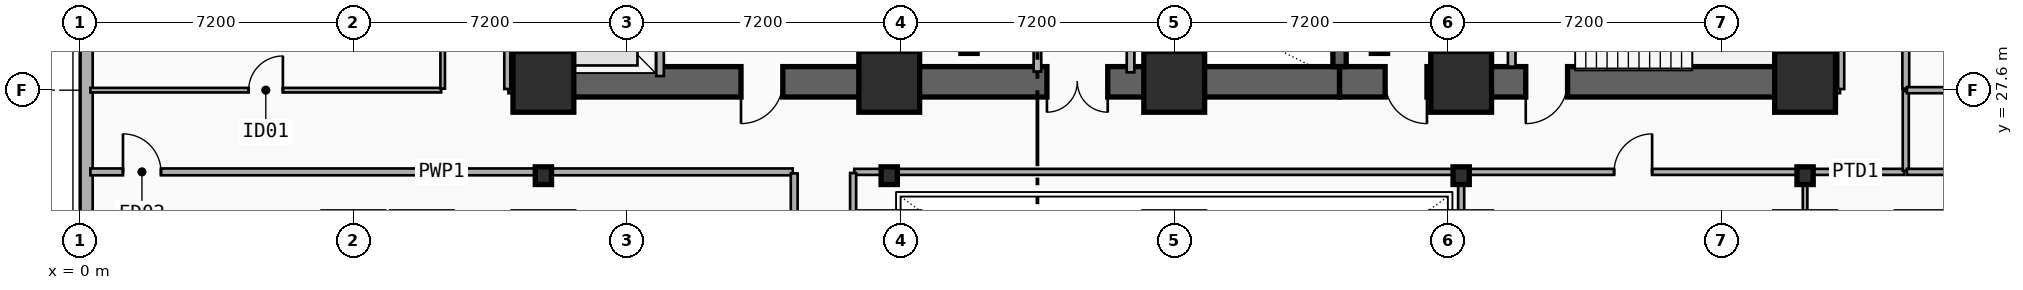
"""IFC4 building model, lengths in metres.
Left out: names, types, materials, properties, quantities, classifications, styles, units other than length and angle.
Written with IfcOpenShell. Run it as: python <this file> out.ifc"""

import sys

from ifc_helpers import new_model, si_unit, direction, frame, frame_2d, origin, origin_2d, place, context, subcontext, project, spatial, rectangle, i_section, extrude, element, fill, save


model = new_model("IFC4")
c1 = context("Model", 3, precision=1e-05, world=origin(), true_north=direction((0.0, 1.0)))
c2 = subcontext(c1, "Body", "Model", "MODEL_VIEW")
j1 = project(units=[si_unit("LENGTHUNIT", "METRE"), si_unit("PLANEANGLEUNIT", "RADIAN")], contexts=[c1])
p1 = place(None, origin())
s1 = spatial("IfcSite", under=j1, at=p1, CompositionType="ELEMENT")
p2 = place(p1, origin())
s2 = spatial("IfcBuilding", under=s1, at=p2, CompositionType="ELEMENT")
p3 = place(p2, frame((0.0, 0.0, 14.9)))
s3 = spatial("IfcBuildingStorey", under=s2, at=p3, CompositionType="ELEMENT", Elevation=14.9)
p4 = place(p3, frame((21.18, 27.82, 0.0), z_axis=(0.0, 0.0, 1.0), x_axis=(-1.0, 0.0, 0.0)))
e1 = element("IfcWall", 1, at=p4, inside=s3, PredefinedType="SHEAR", context=c2, shape_type="SweptSolid", body=[
    extrude(rectangle(XDim=9.03, YDim=0.8, at=frame_2d((4.515, 0.0))), origin(), (0.0, 0.0, 1.0), 4.5),
])
p5 = place(p4, frame((2.68, 0.0, 0.0)))
e2 = element("IfcOpeningElement", 2, at=p5, cuts=e1, PredefinedType="OPENING", context=c2, shape_type="SweptSolid", body=[
    extrude(rectangle(XDim=1.1, YDim=2.15, at=frame_2d((0.55, 1.075))), frame((0.0, 0.41, 0.0), z_axis=(0.0, -1.0, 0.0), x_axis=(1.0, 0.0, 0.0)), (0.0, 0.0, 1.0), 0.82),
])
p6 = place(p3, frame((33.15, 27.82, 0.0), z_axis=(0.0, 0.0, 1.0), x_axis=(-1.0, 0.0, 0.0)))
e3 = element("IfcWall", 3, at=p6, inside=s3, PredefinedType="SHEAR", context=c2, shape_type="SweptSolid", body=[
    extrude(rectangle(XDim=11.97, YDim=0.8, at=frame_2d((5.985, 0.0))), origin(), (0.0, 0.0, 1.0), 4.5),
])
p7 = place(p6, frame((6.1, 0.0, 0.0)))
e4 = element("IfcOpeningElement", 4, at=p7, cuts=e3, PredefinedType="OPENING", context=c2, shape_type="SweptSolid", body=[
    extrude(rectangle(XDim=1.6, YDim=2.2, at=frame_2d((0.8, 1.1))), frame((0.0, 0.41, 0.0), z_axis=(0.0, -1.0, 0.0), x_axis=(1.0, 0.0, 0.0)), (0.0, 0.0, 1.0), 0.82),
])
p8 = place(p3, frame((45.38, 27.82, 0.0), z_axis=(0.0, 0.0, 1.0), x_axis=(-1.0, 0.0, 0.0)))
e5 = element("IfcWall", 5, at=p8, inside=s3, PredefinedType="SHEAR", context=c2, shape_type="SweptSolid", body=[
    extrude(rectangle(XDim=12.23, YDim=0.8, at=frame_2d((6.115, 0.0))), origin(), (0.0, 0.0, 1.0), 4.5),
])
p9 = place(p8, frame((9.93, 0.0, 0.0)))
e6 = element("IfcOpeningElement", 6, at=p9, cuts=e5, PredefinedType="OPENING", context=c2, shape_type="SweptSolid", body=[
    extrude(rectangle(XDim=1.1, YDim=2.15, at=frame_2d((0.55, 1.075))), frame((0.0, 0.41, 0.0), z_axis=(0.0, -1.0, 0.0), x_axis=(1.0, 0.0, 0.0)), (0.0, 0.0, 1.0), 0.82),
])
p10 = place(p8, frame((6.23, 0.0, 0.0)))
e7 = element("IfcOpeningElement", 7, at=p10, cuts=e5, PredefinedType="OPENING", context=c2, shape_type="SweptSolid", body=[
    extrude(rectangle(XDim=1.1, YDim=2.15, at=frame_2d((0.55, 1.075))), frame((0.0, 0.41, 0.0), z_axis=(0.0, -1.0, 0.0), x_axis=(1.0, 0.0, 0.0)), (0.0, 0.0, 1.0), 0.82),
])
for number, where, z_axis, x_axis in (
    (8, (12.15, 28.22, 0.0), (0.0, 0.0, 1.0), (0.0, 1.0, 0.0)),
    (9, (45.38, 28.22, 0.0), (0.0, 0.0, 1.0), (0.0, 1.0, 0.0)),
):
    element("IfcWall", number, at=place(p3, frame(where, z_axis=z_axis, x_axis=x_axis)), inside=s3, PredefinedType="SHEAR", context=c2, shape_type="SweptSolid", body=[
        extrude(rectangle(XDim=8.43, YDim=0.8, at=frame_2d((4.215, 0.0))), origin(), (0.0, 0.0, 1.0), 4.5),
    ])
for number, where, z_axis, x_axis in (
    (10, (21.18, 28.22, 0.0), (0.0, 0.0, 1.0), (0.0, 1.0, 0.0)),
    (11, (33.15, 28.22, 0.0), (0.0, 0.0, 1.0), (0.0, 1.0, 0.0)),
):
    element("IfcWall", number, at=place(p3, frame(where, z_axis=z_axis, x_axis=x_axis)), inside=s3, PredefinedType="SHEAR", context=c2, shape_type="SweptSolid", body=[
        extrude(rectangle(XDim=8.43, YDim=0.35, at=frame_2d((4.215, 0.0))), origin(), (0.0, 0.0, 1.0), 4.5),
    ])
p11 = place(p3, frame((36.38, 28.22, 0.0), z_axis=(0.0, 0.0, 1.0), x_axis=(0.0, 1.0, 0.0)))
e12 = element("IfcWall", 12, at=p11, inside=s3, PredefinedType="SHEAR", context=c2, shape_type="SweptSolid", body=[
    extrude(rectangle(XDim=8.43, YDim=0.35, at=frame_2d((4.215, 0.0))), origin(), (0.0, 0.0, 1.0), 4.5),
])
p12 = place(p11, frame((3.56, 0.0, 0.0)))
e13 = element("IfcOpeningElement", 13, at=p12, cuts=e12, PredefinedType="OPENING", context=c2, shape_type="SweptSolid", body=[
    extrude(rectangle(XDim=1.1, YDim=2.15, at=frame_2d((0.55, 1.075))), frame((0.0, 0.185, 0.0), z_axis=(0.0, -1.0, 0.0), x_axis=(1.0, 0.0, 0.0)), (0.0, 0.0, 1.0), 0.37),
])
for number, where, z_axis, x_axis in (
    (14, (23.4, 28.8, 0.0), (0.0, 0.0, 1.0), (1.0, 0.0, 0.0)),
    (15, (34.2, 28.8, 0.0), (0.0, 0.0, 1.0), (1.0, 0.0, 0.0)),
):
    element("IfcColumn", number, at=place(p3, frame(where, z_axis=z_axis, x_axis=x_axis)), inside=s3, PredefinedType="COLUMN", context=c2, shape_type="SweptSolid", body=[
        extrude(i_section(OverallWidth=0.428, OverallDepth=0.465, WebThickness=0.045, FlangeThickness=0.073, FilletRadius=0.015, at=origin_2d()), origin(), (0.0, 0.0, 1.0), 4.5),
    ])
for number, where, z_axis, x_axis in (
    (16, (12.2, 27.82, 0.0), (0.0, 0.0, 1.0), (1.0, 0.0, 0.0)),
    (17, (21.3, 27.82, 0.0), (0.0, 0.0, 1.0), (1.0, 0.0, 0.0)),
    (18, (28.8, 27.82, 0.0), (0.0, 0.0, 1.0), (1.0, 0.0, 0.0)),
    (19, (36.35, 27.82, 0.0), (0.0, 0.0, 1.0), (1.0, 0.0, 0.0)),
    (20, (45.4, 27.82, 0.0), (0.0, 0.0, 1.0), (1.0, 0.0, 0.0)),
):
    element("IfcColumn", number, at=place(p3, frame(where, z_axis=z_axis, x_axis=x_axis)), inside=s3, PredefinedType="COLUMN", context=c2, shape_type="SweptSolid", body=[
        extrude(rectangle(XDim=1.6, YDim=1.6, at=origin_2d()), origin(), (0.0, 0.0, 1.0), 4.5),
    ])
for number, where, z_axis, x_axis in (
    (21, (12.2, 25.35, 0.0), (0.0, 0.0, 1.0), (1.0, 0.0, 0.0)),
    (22, (21.3, 25.35, 0.0), (0.0, 0.0, 1.0), (1.0, 0.0, 0.0)),
    (23, (36.35, 25.35, 0.0), (0.0, 0.0, 1.0), (1.0, 0.0, 0.0)),
    (24, (45.4, 25.35, 0.0), (0.0, 0.0, 1.0), (1.0, 0.0, 0.0)),
):
    element("IfcColumn", number, at=place(p3, frame(where, z_axis=z_axis, x_axis=x_axis)), inside=s3, PredefinedType="COLUMN", context=c2, shape_type="SweptSolid", body=[
        extrude(i_section(OverallWidth=0.428, OverallDepth=0.465, WebThickness=0.045, FlangeThickness=0.073, FilletRadius=0.015, at=origin_2d()), origin(), (0.0, 0.0, 1.0), 4.5),
    ])
p13 = place(p3, frame((0.18, 7.2, 0.0), z_axis=(0.0, 0.0, 1.0), x_axis=(0.0, 1.0, 0.0)))
e25 = element("IfcWall", 25, at=p13, inside=s3, PredefinedType="SOLIDWALL", context=c2, shape_type="SweptSolid", body=[
    extrude(rectangle(XDim=34.4, YDim=0.32, at=frame_2d((17.2, 0.0))), origin(), (0.0, 0.0, 1.0), 4.2),
])
p14 = place(p13, frame((22.35, 0.0, 0.9)))
e26 = element("IfcOpeningElement", 26, at=p14, cuts=e25, PredefinedType="OPENING", context=c2, shape_type="SweptSolid", body=[
    extrude(rectangle(XDim=2.4, YDim=1.8, at=frame_2d((1.2, 0.9))), frame((0.0, 0.17, 0.0), z_axis=(0.0, -1.0, 0.0), x_axis=(1.0, 0.0, 0.0)), (0.0, 0.0, 1.0), 0.34),
])
p15 = place(p13, frame((26.4, 0.0, 0.9)))
e27 = element("IfcOpeningElement", 27, at=p15, cuts=e25, PredefinedType="OPENING", context=c2, shape_type="SweptSolid", body=[
    extrude(rectangle(XDim=2.4, YDim=1.8, at=frame_2d((1.2, 0.9))), frame((0.0, 0.17, 0.0), z_axis=(0.0, -1.0, 0.0), x_axis=(1.0, 0.0, 0.0)), (0.0, 0.0, 1.0), 0.34),
])
p16 = place(p13, frame((0.847, 0.0, 0.9)))
e28 = element("IfcOpeningElement", 28, at=p16, cuts=e25, PredefinedType="OPENING", context=c2, shape_type="SweptSolid", body=[
    extrude(rectangle(XDim=2.4, YDim=1.8, at=frame_2d((1.2, 0.9))), frame((0.0, 0.17, 0.0), z_axis=(0.0, -1.0, 0.0), x_axis=(1.0, 0.0, 0.0)), (0.0, 0.0, 1.0), 0.34),
])
p17 = place(p13, frame((3.773, 0.0, 0.9)))
e29 = element("IfcOpeningElement", 29, at=p17, cuts=e25, PredefinedType="OPENING", context=c2, shape_type="SweptSolid", body=[
    extrude(rectangle(XDim=2.4, YDim=1.8, at=frame_2d((1.2, 0.9))), frame((0.0, 0.17, 0.0), z_axis=(0.0, -1.0, 0.0), x_axis=(1.0, 0.0, 0.0)), (0.0, 0.0, 1.0), 0.34),
])
p18 = place(p13, frame((9.25, 0.0, 0.9)))
e30 = element("IfcOpeningElement", 30, at=p18, cuts=e25, PredefinedType="OPENING", context=c2, shape_type="SweptSolid", body=[
    extrude(rectangle(XDim=2.4, YDim=1.8, at=frame_2d((1.2, 0.9))), frame((0.0, 0.17, 0.0), z_axis=(0.0, -1.0, 0.0), x_axis=(1.0, 0.0, 0.0)), (0.0, 0.0, 1.0), 0.34),
])
p19 = place(p13, frame((13.6, 0.0, 0.9)))
e31 = element("IfcOpeningElement", 31, at=p19, cuts=e25, PredefinedType="OPENING", context=c2, shape_type="SweptSolid", body=[
    extrude(rectangle(XDim=2.4, YDim=1.8, at=frame_2d((1.2, 0.9))), frame((0.0, 0.17, 0.0), z_axis=(0.0, -1.0, 0.0), x_axis=(1.0, 0.0, 0.0)), (0.0, 0.0, 1.0), 0.34),
])
p20 = place(p3, frame((15.27, 27.97, 0.0), z_axis=(0.0, 0.0, 1.0), x_axis=(0.0, 1.0, 0.0)))
e32 = element("IfcWall", 32, at=p20, inside=s3, PredefinedType="PARTITIONING", context=c2, shape_type="SweptSolid", body=[
    extrude(rectangle(XDim=2.96, YDim=0.2, at=frame_2d((1.48, 0.0))), origin(), (0.0, 0.0, 1.0), 3.172),
])
p21 = place(p20, frame((0.93, 0.0, 0.0)))
e33 = element("IfcOpeningElement", 33, at=p21, cuts=e32, PredefinedType="OPENING", context=c2, shape_type="SweptSolid", body=[
    extrude(rectangle(XDim=1.1, YDim=2.15, at=frame_2d((0.55, 1.075))), frame((0.0, 0.11, 0.0), z_axis=(0.0, -1.0, 0.0), x_axis=(1.0, 0.0, 0.0)), (0.0, 0.0, 1.0), 0.22),
])
p22 = place(p3, frame((27.65, 28.07, 0.0), z_axis=(0.0, 0.0, 1.0), x_axis=(0.0, 1.0, 0.0)))
e34 = element("IfcWall", 34, at=p22, inside=s3, PredefinedType="PARTITIONING", context=c2, shape_type="SweptSolid", body=[
    extrude(rectangle(XDim=2.58, YDim=0.2, at=frame_2d((1.29, 0.0))), origin(), (0.0, 0.0, 1.0), 3.172),
])
p23 = place(p3, frame((37.68, 28.22, 0.0), z_axis=(0.0, 0.0, 1.0), x_axis=(0.0, 1.0, 0.0)))
e35 = element("IfcWall", 35, at=p23, inside=s3, PredefinedType="PARTITIONING", context=c2, shape_type="SweptSolid", body=[
    extrude(rectangle(XDim=3.03, YDim=0.2, at=frame_2d((1.515, 0.0))), origin(), (0.0, 0.0, 1.0), 4.2),
])
p24 = place(p3, frame((25.2, 28.09, 0.0), z_axis=(0.0, 0.0, 1.0), x_axis=(0.0, 1.0, 0.0)))
e36 = element("IfcWall", 36, at=p24, inside=s3, PredefinedType="PARTITIONING", context=c2, shape_type="SweptSolid", body=[
    extrude(rectangle(XDim=1.72, YDim=0.2, at=frame_2d((0.86, 0.0))), origin(), (0.0, 0.0, 1.0), 4.2),
])
p25 = place(p24, frame((0.58, 0.0, 0.0)))
e37 = element("IfcOpeningElement", 37, at=p25, cuts=e36, PredefinedType="OPENING", context=c2, shape_type="SweptSolid", body=[
    extrude(rectangle(XDim=1.0, YDim=2.15, at=frame_2d((0.5, 1.075))), frame((0.0, 0.11, 0.0), z_axis=(0.0, -1.0, 0.0), x_axis=(1.0, 0.0, 0.0)), (0.0, 0.0, 1.0), 0.22),
])
p26 = place(p3, frame((0.28, 27.6, 0.0), z_axis=(0.0, 0.0, 1.0), x_axis=(1.0, 0.0, 0.0)))
e38 = element("IfcWall", 38, at=p26, inside=s3, PredefinedType="PARTITIONING", context=c2, shape_type="SweptSolid", body=[
    extrude(rectangle(XDim=9.23, YDim=0.12, at=frame_2d((4.615, 0.0))), origin(), (0.0, 0.0, 1.0), 4.2),
])
p27 = place(p26, frame((4.165, 0.0, 0.0)))
e39 = element("IfcOpeningElement", 39, at=p27, cuts=e38, PredefinedType="OPENING", context=c2, shape_type="SweptSolid", body=[
    extrude(rectangle(XDim=0.9, YDim=2.1, at=frame_2d((0.45, 1.05))), frame((0.0, 0.07, 0.0), z_axis=(0.0, -1.0, 0.0), x_axis=(1.0, 0.0, 0.0)), (0.0, 0.0, 1.0), 0.14),
])
p28 = place(p3, frame((0.28, 25.45, 0.0), z_axis=(0.0, 0.0, 1.0), x_axis=(1.0, 0.0, 0.0)))
e40 = element("IfcWall", 40, at=p28, inside=s3, PredefinedType="PLUMBINGWALL", context=c2, shape_type="SweptSolid", body=[
    extrude(rectangle(XDim=18.48, YDim=0.18, at=frame_2d((9.24, 0.0))), origin(), (0.0, 0.0, 1.0), 3.366),
])
p29 = place(p28, frame((0.857, 0.0, 0.0)))
e41 = element("IfcOpeningElement", 41, at=p29, cuts=e40, PredefinedType="OPENING", context=c2, shape_type="SweptSolid", body=[
    extrude(rectangle(XDim=1.0, YDim=2.15, at=frame_2d((0.5, 1.075))), frame((0.0, 0.1, 0.0), z_axis=(0.0, -1.0, 0.0), x_axis=(1.0, 0.0, 0.0)), (0.0, 0.0, 1.0), 0.2),
])
p30 = place(p3, frame((36.39, 25.45, 0.0), z_axis=(0.0, 0.0, 1.0), x_axis=(1.0, 0.0, 0.0)))
e42 = element("IfcWall", 42, at=p30, inside=s3, PredefinedType="PARTITIONING", context=c2, shape_type="SweptSolid", body=[
    extrude(rectangle(XDim=8.97, YDim=0.16, at=frame_2d((4.485, 0.0))), origin(), (0.0, 0.0, 1.0), 3.366),
])
p31 = place(p30, frame((3.985, 0.0, 0.0)))
e43 = element("IfcOpeningElement", 43, at=p31, cuts=e42, PredefinedType="OPENING", context=c2, shape_type="SweptSolid", body=[
    extrude(rectangle(XDim=1.0, YDim=2.15, at=frame_2d((0.5, 1.075))), frame((0.0, 0.09, 0.0), z_axis=(0.0, -1.0, 0.0), x_axis=(1.0, 0.0, 0.0)), (0.0, 0.0, 1.0), 0.18),
])
p32 = place(p3, frame((45.44, 25.45, 0.0), z_axis=(0.0, 0.0, 1.0), x_axis=(1.0, 0.0, 0.0)))
e44 = element("IfcWall", 44, at=p32, inside=s3, PredefinedType="PARTITIONING", context=c2, shape_type="SweptSolid", body=[
    extrude(rectangle(XDim=2.57, YDim=0.16, at=frame_2d((1.285, 0.0))), origin(), (0.0, 0.0, 1.0), 3.366),
])
p33 = place(p3, frame((9.55, 27.64, 0.0), z_axis=(0.0, 0.0, 1.0), x_axis=(0.0, 1.0, 0.0)))
e45 = element("IfcWall", 45, at=p33, inside=s3, PredefinedType="PARTITIONING", context=c2, shape_type="SweptSolid", body=[
    extrude(rectangle(XDim=10.27, YDim=0.12, at=frame_2d((5.135, 0.0))), origin(), (0.0, 0.0, 1.0), 4.2),
])
p34 = place(p33, frame((4.685, 0.0, 0.0)))
e46 = element("IfcOpeningElement", 46, at=p34, cuts=e45, PredefinedType="OPENING", context=c2, shape_type="SweptSolid", body=[
    extrude(rectangle(XDim=0.9, YDim=2.1, at=frame_2d((0.45, 1.05))), frame((0.0, 0.07, 0.0), z_axis=(0.0, -1.0, 0.0), x_axis=(1.0, 0.0, 0.0)), (0.0, 0.0, 1.0), 0.14),
])
p35 = place(p3, frame((48.05, 27.64, 0.0), z_axis=(0.0, 0.0, 1.0), x_axis=(0.0, 1.0, 0.0)))
e47 = element("IfcWall", 47, at=p35, inside=s3, PredefinedType="PLUMBINGWALL", context=c2, shape_type="SweptSolid", body=[
    extrude(rectangle(XDim=3.92, YDim=0.18, at=frame_2d((1.96, 0.0))), origin(), (0.0, 0.0, 1.0), 4.2),
])
p36 = place(p35, frame((1.535, 0.0, 0.0)))
e48 = element("IfcOpeningElement", 48, at=p36, cuts=e47, PredefinedType="OPENING", context=c2, shape_type="SweptSolid", body=[
    extrude(rectangle(XDim=0.85, YDim=2.1, at=frame_2d((0.425, 1.05))), frame((0.0, 0.1, 0.0), z_axis=(0.0, -1.0, 0.0), x_axis=(1.0, 0.0, 0.0)), (0.0, 0.0, 1.0), 0.2),
])
p37 = place(p3, frame((18.8, 14.24, 0.0), z_axis=(0.0, 0.0, 1.0), x_axis=(0.0, 1.0, 0.0)))
e49 = element("IfcWall", 49, at=p37, inside=s3, PredefinedType="PLUMBINGWALL", context=c2, shape_type="SweptSolid", body=[
    extrude(rectangle(XDim=11.17, YDim=0.18, at=frame_2d((5.585, 0.0))), origin(), (0.0, 0.0, 1.0), 3.172),
])
p38 = place(p37, frame((5.085, 0.0, 0.0)))
e50 = element("IfcOpeningElement", 50, at=p38, cuts=e49, PredefinedType="OPENING", context=c2, shape_type="SweptSolid", body=[
    extrude(rectangle(XDim=1.0, YDim=2.15, at=frame_2d((0.5, 1.075))), frame((0.0, 0.1, 0.0), z_axis=(0.0, -1.0, 0.0), x_axis=(1.0, 0.0, 0.0)), (0.0, 0.0, 1.0), 0.2),
])
p39 = place(p3, frame((45.4, 14.24, 0.0), z_axis=(0.0, 0.0, 1.0), x_axis=(0.0, 1.0, 0.0)))
e51 = element("IfcWall", 51, at=p39, inside=s3, PredefinedType="PARTITIONING", context=c2, shape_type="SweptSolid", body=[
    extrude(rectangle(XDim=11.17, YDim=0.12, at=frame_2d((5.585, 0.0))), origin(), (0.0, 0.0, 1.0), 3.172),
])
p40 = place(p39, frame((5.135, 0.0, 0.0)))
e52 = element("IfcOpeningElement", 52, at=p40, cuts=e51, PredefinedType="OPENING", context=c2, shape_type="SweptSolid", body=[
    extrude(rectangle(XDim=0.9, YDim=2.1, at=frame_2d((0.45, 1.05))), frame((0.0, 0.07, 0.0), z_axis=(0.0, -1.0, 0.0), x_axis=(1.0, 0.0, 0.0)), (0.0, 0.0, 1.0), 0.14),
])
p41 = place(p3, frame((20.38, 25.45, 0.0), z_axis=(0.0, 0.0, 1.0), x_axis=(1.0, 0.0, 0.0)))
e53 = element("IfcWall", 53, at=p41, inside=s3, PredefinedType="PARTITIONING", context=c2, shape_type="SweptSolid", body=[
    extrude(rectangle(XDim=15.94, YDim=0.16, at=frame_2d((7.97, 0.0))), origin(), (0.0, 0.0, 1.0), 3.366),
])
p42 = place(p3, frame((11.28, 27.6, 0.0), z_axis=(0.0, 0.0, 1.0), x_axis=(1.0, 0.0, 0.0)))
e54 = element("IfcWall", 54, at=p42, inside=s3, PredefinedType="PARTITIONING", context=c2, shape_type="SweptSolid", body=[
    extrude(rectangle(XDim=0.84, YDim=0.16, at=frame_2d((0.42, 0.0))), origin(), (0.0, 0.0, 1.0), 3.172),
])
p43 = place(p3, frame((45.41, 27.6, 0.0), z_axis=(0.0, 0.0, 1.0), x_axis=(1.0, 0.0, 0.0)))
e55 = element("IfcWall", 55, at=p43, inside=s3, PredefinedType="PARTITIONING", context=c2, shape_type="SweptSolid", body=[
    extrude(rectangle(XDim=0.91, YDim=0.16, at=frame_2d((0.455, 0.0))), origin(), (0.0, 0.0, 1.0), 3.172),
])
p44 = place(p3, frame((48.05, 25.48, 0.0), z_axis=(0.0, 0.0, 1.0), x_axis=(0.0, 1.0, 0.0)))
e56 = element("IfcWall", 56, at=p44, inside=s3, PredefinedType="PARTITIONING", context=c2, shape_type="SweptSolid", body=[
    extrude(rectangle(XDim=2.09, YDim=0.16, at=frame_2d((1.045, 0.0))), origin(), (0.0, 0.0, 1.0), 4.2),
])
for number, where, z_axis, x_axis in (
    (57, (11.25, 27.63, 0.0), (0.0, 0.0, 1.0), (0.0, 1.0, 0.0)),
    (58, (46.35, 27.63, 0.0), (0.0, 0.0, 1.0), (0.0, 1.0, 0.0)),
):
    element("IfcWall", number, at=place(p3, frame(where, z_axis=z_axis, x_axis=x_axis)), inside=s3, PredefinedType="PARTITIONING", context=c2, shape_type="SweptSolid", body=[
        extrude(rectangle(XDim=10.29, YDim=0.16, at=frame_2d((5.145, 0.0))), origin(), (0.0, 0.0, 1.0), 4.2),
    ])
p45 = place(p3, frame((48.08, 27.6, 0.0), z_axis=(0.0, 0.0, 1.0), x_axis=(1.0, 0.0, 0.0)))
e59 = element("IfcWall", 59, at=p45, inside=s3, PredefinedType="PARTITIONING", context=c2, shape_type="SweptSolid", body=[
    extrude(rectangle(XDim=4.69, YDim=0.16, at=frame_2d((2.345, 0.0))), origin(), (0.0, 0.0, 1.0), 4.2),
])
for number, where, z_axis, x_axis in (
    (60, (20.35, 14.23, 0.0), (0.0, 0.0, 1.0), (0.0, 1.0, 0.0)),
    (61, (36.35, 14.23, 0.0), (0.0, 0.0, 1.0), (0.0, 1.0, 0.0)),
):
    element("IfcWall", number, at=place(p3, frame(where, z_axis=z_axis, x_axis=x_axis)), inside=s3, PredefinedType="PARTITIONING", context=c2, shape_type="SweptSolid", body=[
        extrude(rectangle(XDim=11.19, YDim=0.16, at=frame_2d((5.595, 0.0))), origin(), (0.0, 0.0, 1.0), 3.172),
    ])
p46 = place(p3, frame((48.08, 25.45, 0.0), z_axis=(0.0, 0.0, 1.0), x_axis=(1.0, 0.0, 0.0)))
e62 = element("IfcWall", 62, at=p46, inside=s3, PredefinedType="PARTITIONING", context=c2, shape_type="SweptSolid", body=[
    extrude(rectangle(XDim=9.21, YDim=0.16, at=frame_2d((4.605, 0.0))), origin(), (0.0, 0.0, 1.0), 4.2),
])
p47 = place(p5, origin())
e63 = element("IfcDoor", 63, at=p47, inside=s3, OperationType="SINGLE_SWING_RIGHT", PredefinedType="DOOR", context=c2, shape_type="SweptSolid", body=[
    extrude(rectangle(XDim=1.1, YDim=2.15, at=frame_2d((0.55, 1.075))), frame((0.0, 0.025, 0.0), z_axis=(0.0, -1.0, 0.0), x_axis=(1.0, 0.0, 0.0)), (0.0, 0.0, 1.0), 0.05),
])
fill(e2, e63)
p48 = place(p9, origin())
e64 = element("IfcDoor", 64, at=p48, inside=s3, OperationType="SINGLE_SWING_LEFT", PredefinedType="DOOR", context=c2, shape_type="SweptSolid", body=[
    extrude(rectangle(XDim=1.1, YDim=2.15, at=frame_2d((0.55, 1.075))), frame((0.0, 0.025, 0.0), z_axis=(0.0, -1.0, 0.0), x_axis=(1.0, 0.0, 0.0)), (0.0, 0.0, 1.0), 0.05),
])
fill(e6, e64)
p49 = place(p10, origin())
e65 = element("IfcDoor", 65, at=p49, inside=s3, OperationType="SINGLE_SWING_RIGHT", PredefinedType="DOOR", context=c2, shape_type="SweptSolid", body=[
    extrude(rectangle(XDim=1.1, YDim=2.15, at=frame_2d((0.55, 1.075))), frame((0.0, 0.025, 0.0), z_axis=(0.0, -1.0, 0.0), x_axis=(1.0, 0.0, 0.0)), (0.0, 0.0, 1.0), 0.05),
])
fill(e7, e65)
p50 = place(p7, origin())
e66 = element("IfcDoor", 66, at=p50, inside=s3, OperationType="SINGLE_SWING_LEFT", PredefinedType="DOOR", context=c2, shape_type="SweptSolid", body=[
    extrude(rectangle(XDim=1.6, YDim=2.2, at=frame_2d((0.8, 1.1))), frame((0.0, 0.025, 0.0), z_axis=(0.0, -1.0, 0.0), x_axis=(1.0, 0.0, 0.0)), (0.0, 0.0, 1.0), 0.05),
])
fill(e4, e66)
p51 = place(p27, origin())
e67 = element("IfcDoor", 67, at=p51, inside=s3, OperationType="SINGLE_SWING_RIGHT", PredefinedType="DOOR", context=c2, shape_type="SweptSolid", body=[
    extrude(rectangle(XDim=0.9, YDim=2.1, at=frame_2d((0.45, 1.05))), frame((0.0, 0.025, 0.0), z_axis=(0.0, -1.0, 0.0), x_axis=(1.0, 0.0, 0.0)), (0.0, 0.0, 1.0), 0.05),
])
fill(e39, e67)
p52 = place(p29, origin())
e68 = element("IfcDoor", 68, at=p52, inside=s3, OperationType="SINGLE_SWING_LEFT", PredefinedType="DOOR", context=c2, shape_type="SweptSolid", body=[
    extrude(rectangle(XDim=1.0, YDim=2.15, at=frame_2d((0.5, 1.075))), frame((0.0, 0.025, 0.0), z_axis=(0.0, -1.0, 0.0), x_axis=(1.0, 0.0, 0.0)), (0.0, 0.0, 1.0), 0.05),
])
fill(e41, e68)
p53 = place(p31, origin())
e69 = element("IfcDoor", 69, at=p53, inside=s3, OperationType="SINGLE_SWING_RIGHT", PredefinedType="DOOR", context=c2, shape_type="SweptSolid", body=[
    extrude(rectangle(XDim=1.0, YDim=2.15, at=frame_2d((0.5, 1.075))), frame((0.0, 0.025, 0.0), z_axis=(0.0, -1.0, 0.0), x_axis=(1.0, 0.0, 0.0)), (0.0, 0.0, 1.0), 0.05),
])
fill(e43, e69)
save(model, sys.argv[1])
